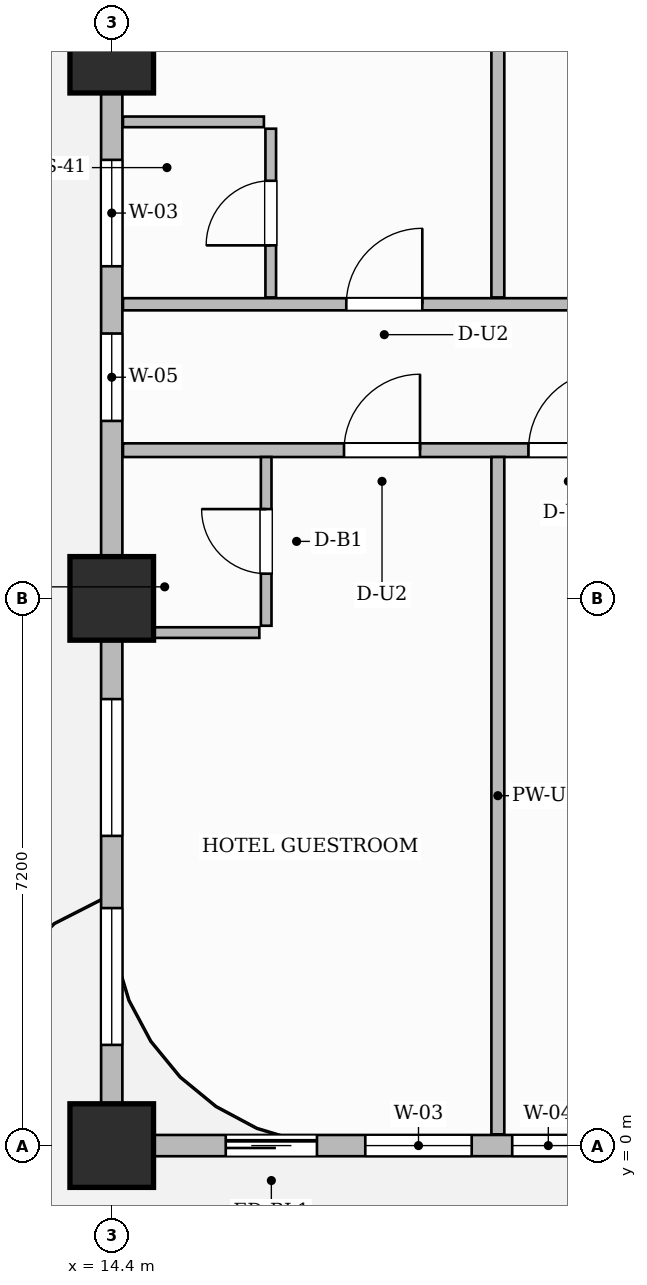
"""IFC4 building model, lengths in metres.
Left out: names, types, materials, properties, quantities, classifications, styles, units other than length and angle.
Written with IfcOpenShell. Run it as: python <this file> out.ifc"""

import sys

from ifc_helpers import new_model, si_unit, direction, frame, frame_2d, origin, origin_2d, place, context, subcontext, project, spatial, rectangle, extrude, source, transform, mapped, element, fill, save


model = new_model("IFC4")
c1 = context("Model", 3, precision=1e-05, world=origin(), true_north=direction((0.0, 1.0)))
c2 = subcontext(c1, "Body", "Model", "MODEL_VIEW")
j1 = project(units=[si_unit("LENGTHUNIT", "METRE"), si_unit("PLANEANGLEUNIT", "RADIAN")], contexts=[c1])
p1 = place(None, origin())
s1 = spatial("IfcSite", under=j1, at=p1, CompositionType="ELEMENT")
p2 = place(p1, origin())
s2 = spatial("IfcBuilding", under=s1, at=p2, CompositionType="ELEMENT")
p3 = place(p2, frame((0.0, 0.0, 36.1)))
s3 = spatial("IfcBuildingStorey", under=s2, at=p3, CompositionType="ELEMENT", Elevation=36.1)
m1 = source(origin(), c2, "Body", "SweptSolid", [
    extrude(rectangle(XDim=1.1, YDim=1.1, at=origin_2d()), origin(), (0.0, 0.0, 1.0), 3.7),
])
for number, where, z_axis, x_axis in (
    (1, (14.4, 0.0, 0.0), (0.0, 0.0, 1.0), (1.0, 0.0, 0.0)),
    (2, (14.4, 7.2, 0.0), (0.0, 0.0, 1.0), (1.0, 0.0, 0.0)),
    (3, (14.4, 14.4, 0.0), (0.0, 0.0, 1.0), (1.0, 0.0, 0.0)),
):
    element("IfcColumn", number, at=place(p3, frame(where, z_axis=z_axis, x_axis=x_axis)), inside=s3, PredefinedType="COLUMN", context=c2, shape_type="MappedRepresentation", body=[
        mapped(m1, transform((0.0, 0.0, 0.0), scale=1.0)),
    ])
p4 = place(p3, frame((14.548, 9.15, 0.0), z_axis=(0.0, 0.0, 1.0), x_axis=(1.0, 0.0, 0.0)))
e4 = element("IfcWall", 4, at=p4, inside=s3, PredefinedType="PARTITIONING", context=c2, shape_type="SweptSolid", body=[
    extrude(rectangle(XDim=15.562, YDim=0.18, at=frame_2d((7.781, 0.0))), origin(), (0.0, 0.0, 1.0), 3.45),
])
p5 = place(p4, frame((2.908, 0.0, 0.0)))
e5 = element("IfcOpeningElement", 5, at=p5, cuts=e4, PredefinedType="OPENING", context=c2, shape_type="SweptSolid", body=[
    extrude(rectangle(XDim=1.0, YDim=2.2, at=frame_2d((0.5, 1.1))), frame((0.0, 0.1, 0.0), z_axis=(0.0, -1.0, 0.0), x_axis=(1.0, 0.0, 0.0)), (0.0, 0.0, 1.0), 0.2),
])
p6 = place(p4, frame((5.334, 0.0, 0.0)))
e6 = element("IfcOpeningElement", 6, at=p6, cuts=e4, PredefinedType="OPENING", context=c2, shape_type="SweptSolid", body=[
    extrude(rectangle(XDim=1.05, YDim=2.25, at=frame_2d((0.525, 1.125))), frame((0.0, 0.1, 0.0), z_axis=(0.0, -1.0, 0.0), x_axis=(1.0, 0.0, 0.0)), (0.0, 0.0, 1.0), 0.2),
])
p7 = place(p4, frame((13.72, 0.0, 0.0)))
e7 = element("IfcOpeningElement", 7, at=p7, cuts=e4, PredefinedType="OPENING", context=c2, shape_type="SweptSolid", body=[
    extrude(rectangle(XDim=1.0, YDim=2.2, at=frame_2d((0.5, 1.1))), frame((0.0, 0.1, 0.0), z_axis=(0.0, -1.0, 0.0), x_axis=(1.0, 0.0, 0.0)), (0.0, 0.0, 1.0), 0.2),
])
p8 = place(p3, frame((14.548, 11.07, 0.0), z_axis=(0.0, 0.0, 1.0), x_axis=(1.0, 0.0, 0.0)))
e8 = element("IfcWall", 8, at=p8, inside=s3, PredefinedType="PARTITIONING", context=c2, shape_type="SweptSolid", body=[
    extrude(rectangle(XDim=15.562, YDim=0.16, at=frame_2d((7.781, 0.0))), origin(), (0.0, 0.0, 1.0), 3.45),
])
p9 = place(p8, frame((2.938, 0.0, 0.0)))
e9 = element("IfcOpeningElement", 9, at=p9, cuts=e8, PredefinedType="OPENING", context=c2, shape_type="SweptSolid", body=[
    extrude(rectangle(XDim=1.0, YDim=2.2, at=frame_2d((0.5, 1.1))), frame((0.0, 0.09, 0.0), z_axis=(0.0, -1.0, 0.0), x_axis=(1.0, 0.0, 0.0)), (0.0, 0.0, 1.0), 0.18),
])
p10 = place(p8, frame((6.667, 0.0, 0.0)))
e10 = element("IfcOpeningElement", 10, at=p10, cuts=e8, PredefinedType="OPENING", context=c2, shape_type="SweptSolid", body=[
    extrude(rectangle(XDim=1.05, YDim=2.25, at=frame_2d((0.525, 1.125))), frame((0.0, 0.09, 0.0), z_axis=(0.0, -1.0, 0.0), x_axis=(1.0, 0.0, 0.0)), (0.0, 0.0, 1.0), 0.18),
])
p11 = place(p3, frame((19.48, 0.148, 0.0), z_axis=(0.0, 0.0, 1.0), x_axis=(0.0, 1.0, 0.0)))
e11 = element("IfcWall", 11, at=p11, inside=s3, PredefinedType="PARTITIONING", context=c2, shape_type="SweptSolid", body=[
    extrude(rectangle(XDim=8.912, YDim=0.17, at=frame_2d((4.456, 0.0))), origin(), (0.0, 0.0, 1.0), 3.45),
])
p12 = place(p3, frame((16.432, 6.84, 0.0), z_axis=(0.0, 0.0, 1.0), x_axis=(0.0, 1.0, 0.0)))
e12 = element("IfcWall", 12, at=p12, inside=s3, PredefinedType="PARTITIONING", context=c2, shape_type="SweptSolid", body=[
    extrude(rectangle(XDim=2.22, YDim=0.14, at=frame_2d((1.11, 0.0))), origin(), (0.0, 0.0, 1.0), 3.45),
])
p13 = place(p12, frame((0.685, 0.0, 0.0)))
e13 = element("IfcOpeningElement", 13, at=p13, cuts=e12, PredefinedType="OPENING", context=c2, shape_type="SweptSolid", body=[
    extrude(rectangle(XDim=0.85, YDim=2.1, at=frame_2d((0.425, 1.05))), frame((0.0, 0.08, 0.0), z_axis=(0.0, -1.0, 0.0), x_axis=(1.0, 0.0, 0.0)), (0.0, 0.0, 1.0), 0.16),
])
p14 = place(p3, frame((14.49, 6.75, 0.0), z_axis=(0.0, 0.0, 1.0), x_axis=(1.0, 0.0, 0.0)))
e14 = element("IfcWall", 14, at=p14, inside=s3, PredefinedType="PARTITIONING", context=c2, shape_type="SweptSolid", body=[
    extrude(rectangle(XDim=1.852, YDim=0.14, at=frame_2d((0.926, 0.0))), origin(), (0.0, 0.0, 1.0), 3.45),
])
p15 = place(p3, frame((19.48, 11.16, 0.0), z_axis=(0.0, 0.0, 1.0), x_axis=(0.0, 1.0, 0.0)))
e15 = element("IfcWall", 15, at=p15, inside=s3, PredefinedType="PARTITIONING", context=c2, shape_type="SweptSolid", body=[
    extrude(rectangle(XDim=10.292, YDim=0.17, at=frame_2d((5.146, 0.0))), origin(), (0.0, 0.0, 1.0), 3.45),
])
p16 = place(p3, frame((16.492, 11.16, 0.0), z_axis=(0.0, 0.0, 1.0), x_axis=(0.0, 1.0, 0.0)))
e16 = element("IfcWall", 16, at=p16, inside=s3, PredefinedType="PARTITIONING", context=c2, shape_type="SweptSolid", body=[
    extrude(rectangle(XDim=2.22, YDim=0.14, at=frame_2d((1.11, 0.0))), origin(), (0.0, 0.0, 1.0), 3.45),
])
p17 = place(p16, frame((0.685, 0.0, 0.0)))
e17 = element("IfcOpeningElement", 17, at=p17, cuts=e16, PredefinedType="OPENING", context=c2, shape_type="SweptSolid", body=[
    extrude(rectangle(XDim=0.85, YDim=2.1, at=frame_2d((0.425, 1.05))), frame((0.0, 0.08, 0.0), z_axis=(0.0, -1.0, 0.0), x_axis=(1.0, 0.0, 0.0)), (0.0, 0.0, 1.0), 0.16),
])
p18 = place(p3, frame((14.548, 13.47, 0.0), z_axis=(0.0, 0.0, 1.0), x_axis=(1.0, 0.0, 0.0)))
e18 = element("IfcWall", 18, at=p18, inside=s3, PredefinedType="PARTITIONING", context=c2, shape_type="SweptSolid", body=[
    extrude(rectangle(XDim=1.854, YDim=0.14, at=frame_2d((0.927, 0.0))), origin(), (0.0, 0.0, 1.0), 3.45),
])
p19 = place(p3, frame((14.4, 0.0, 0.0), z_axis=(0.0, 0.0, 1.0), x_axis=(1.0, 0.0, 0.0)))
e19 = element("IfcWall", 19, at=p19, inside=s3, PredefinedType="SOLIDWALL", context=c2, shape_type="SweptSolid", body=[
    extrude(rectangle(XDim=43.2, YDim=0.28, at=frame_2d((21.6, 0.0))), origin(), (0.0, 0.0, 1.0), 2.885),
])
p20 = place(p19, frame((1.5, 0.0, 0.0)))
e20 = element("IfcOpeningElement", 20, at=p20, cuts=e19, PredefinedType="OPENING", context=c2, shape_type="SweptSolid", body=[
    extrude(rectangle(XDim=1.2, YDim=2.2, at=frame_2d((0.6, 1.1))), frame((0.0, 0.15, 0.0), z_axis=(0.0, -1.0, 0.0), x_axis=(1.0, 0.0, 0.0)), (0.0, 0.0, 1.0), 0.3),
])
p21 = place(p19, frame((3.336, 0.0, 0.8)))
e21 = element("IfcOpeningElement", 21, at=p21, cuts=e19, PredefinedType="OPENING", context=c2, shape_type="SweptSolid", body=[
    extrude(rectangle(XDim=1.4, YDim=1.85, at=frame_2d((0.7, 0.925))), frame((0.0, 0.15, 0.0), z_axis=(0.0, -1.0, 0.0), x_axis=(1.0, 0.0, 0.0)), (0.0, 0.0, 1.0), 0.3),
])
p22 = place(p19, frame((5.269, 0.0, 0.8)))
e22 = element("IfcOpeningElement", 22, at=p22, cuts=e19, PredefinedType="OPENING", context=c2, shape_type="SweptSolid", body=[
    extrude(rectangle(XDim=0.95, YDim=1.75, at=frame_2d((0.475, 0.875))), frame((0.0, 0.15, 0.0), z_axis=(0.0, -1.0, 0.0), x_axis=(1.0, 0.0, 0.0)), (0.0, 0.0, 1.0), 0.3),
])
p23 = place(p19, frame((8.389, 0.0, 0.8)))
e23 = element("IfcOpeningElement", 23, at=p23, cuts=e19, PredefinedType="OPENING", context=c2, shape_type="SweptSolid", body=[
    extrude(rectangle(XDim=1.8, YDim=1.85, at=frame_2d((0.9, 0.925))), frame((0.0, 0.15, 0.0), z_axis=(0.0, -1.0, 0.0), x_axis=(1.0, 0.0, 0.0)), (0.0, 0.0, 1.0), 0.3),
])
p24 = place(p19, frame((11.197, 0.0, 0.8)))
e24 = element("IfcOpeningElement", 24, at=p24, cuts=e19, PredefinedType="OPENING", context=c2, shape_type="SweptSolid", body=[
    extrude(rectangle(XDim=1.8, YDim=1.85, at=frame_2d((0.9, 0.925))), frame((0.0, 0.15, 0.0), z_axis=(0.0, -1.0, 0.0), x_axis=(1.0, 0.0, 0.0)), (0.0, 0.0, 1.0), 0.3),
])
p25 = place(p19, frame((16.804, 0.0, 0.8)))
e25 = element("IfcOpeningElement", 25, at=p25, cuts=e19, PredefinedType="OPENING", context=c2, shape_type="SweptSolid", body=[
    extrude(rectangle(XDim=1.8, YDim=1.85, at=frame_2d((0.9, 0.925))), frame((0.0, 0.15, 0.0), z_axis=(0.0, -1.0, 0.0), x_axis=(1.0, 0.0, 0.0)), (0.0, 0.0, 1.0), 0.3),
])
p26 = place(p19, frame((21.725, 0.0, 0.8)))
e26 = element("IfcOpeningElement", 26, at=p26, cuts=e19, PredefinedType="OPENING", context=c2, shape_type="SweptSolid", body=[
    extrude(rectangle(XDim=1.8, YDim=1.85, at=frame_2d((0.9, 0.925))), frame((0.0, 0.15, 0.0), z_axis=(0.0, -1.0, 0.0), x_axis=(1.0, 0.0, 0.0)), (0.0, 0.0, 1.0), 0.3),
])
p27 = place(p19, frame((24.475, 0.0, 0.8)))
e27 = element("IfcOpeningElement", 27, at=p27, cuts=e19, PredefinedType="OPENING", context=c2, shape_type="SweptSolid", body=[
    extrude(rectangle(XDim=1.8, YDim=1.85, at=frame_2d((0.9, 0.925))), frame((0.0, 0.15, 0.0), z_axis=(0.0, -1.0, 0.0), x_axis=(1.0, 0.0, 0.0)), (0.0, 0.0, 1.0), 0.3),
])
p28 = place(p19, frame((29.075, 0.0, 0.8)))
e28 = element("IfcOpeningElement", 28, at=p28, cuts=e19, PredefinedType="OPENING", context=c2, shape_type="SweptSolid", body=[
    extrude(rectangle(XDim=1.8, YDim=1.85, at=frame_2d((0.9, 0.925))), frame((0.0, 0.15, 0.0), z_axis=(0.0, -1.0, 0.0), x_axis=(1.0, 0.0, 0.0)), (0.0, 0.0, 1.0), 0.3),
])
p29 = place(p19, frame((32.125, 0.0, 0.8)))
e29 = element("IfcOpeningElement", 29, at=p29, cuts=e19, PredefinedType="OPENING", context=c2, shape_type="SweptSolid", body=[
    extrude(rectangle(XDim=1.8, YDim=1.85, at=frame_2d((0.9, 0.925))), frame((0.0, 0.15, 0.0), z_axis=(0.0, -1.0, 0.0), x_axis=(1.0, 0.0, 0.0)), (0.0, 0.0, 1.0), 0.3),
])
p30 = place(p19, frame((36.875, 0.0, 0.8)))
e30 = element("IfcOpeningElement", 30, at=p30, cuts=e19, PredefinedType="OPENING", context=c2, shape_type="SweptSolid", body=[
    extrude(rectangle(XDim=1.8, YDim=1.85, at=frame_2d((0.9, 0.925))), frame((0.0, 0.15, 0.0), z_axis=(0.0, -1.0, 0.0), x_axis=(1.0, 0.0, 0.0)), (0.0, 0.0, 1.0), 0.3),
])
p31 = place(p19, frame((39.925, 0.0, 0.8)))
e31 = element("IfcOpeningElement", 31, at=p31, cuts=e19, PredefinedType="OPENING", context=c2, shape_type="SweptSolid", body=[
    extrude(rectangle(XDim=1.8, YDim=1.85, at=frame_2d((0.9, 0.925))), frame((0.0, 0.15, 0.0), z_axis=(0.0, -1.0, 0.0), x_axis=(1.0, 0.0, 0.0)), (0.0, 0.0, 1.0), 0.3),
])
p32 = place(p3, frame((14.4, 0.05, 0.0), z_axis=(0.0, 0.0, 1.0), x_axis=(0.0, 1.0, 0.0)))
e32 = element("IfcWall", 32, at=p32, inside=s3, PredefinedType="SOLIDWALL", context=c2, shape_type="SweptSolid", body=[
    extrude(rectangle(XDim=21.5, YDim=0.28, at=frame_2d((10.75, 0.0))), origin(), (0.0, 0.0, 1.0), 2.885),
])
p33 = place(p32, frame((1.275, 0.0, 0.8)))
e33 = element("IfcOpeningElement", 33, at=p33, cuts=e32, PredefinedType="OPENING", context=c2, shape_type="SweptSolid", body=[
    extrude(rectangle(XDim=1.8, YDim=1.85, at=frame_2d((0.9, 0.925))), frame((0.0, 0.15, 0.0), z_axis=(0.0, -1.0, 0.0), x_axis=(1.0, 0.0, 0.0)), (0.0, 0.0, 1.0), 0.3),
])
p34 = place(p32, frame((4.025, 0.0, 0.8)))
e34 = element("IfcOpeningElement", 34, at=p34, cuts=e32, PredefinedType="OPENING", context=c2, shape_type="SweptSolid", body=[
    extrude(rectangle(XDim=1.8, YDim=1.85, at=frame_2d((0.9, 0.925))), frame((0.0, 0.15, 0.0), z_axis=(0.0, -1.0, 0.0), x_axis=(1.0, 0.0, 0.0)), (0.0, 0.0, 1.0), 0.3),
])
p35 = place(p32, frame((9.485, 0.0, 0.8)))
e35 = element("IfcOpeningElement", 35, at=p35, cuts=e32, PredefinedType="OPENING", context=c2, shape_type="SweptSolid", body=[
    extrude(rectangle(XDim=1.15, YDim=1.8, at=frame_2d((0.575, 0.9))), frame((0.0, 0.15, 0.0), z_axis=(0.0, -1.0, 0.0), x_axis=(1.0, 0.0, 0.0)), (0.0, 0.0, 1.0), 0.3),
])
p36 = place(p32, frame((11.52, 0.0, 0.8)))
e36 = element("IfcOpeningElement", 36, at=p36, cuts=e32, PredefinedType="OPENING", context=c2, shape_type="SweptSolid", body=[
    extrude(rectangle(XDim=1.4, YDim=1.85, at=frame_2d((0.7, 0.925))), frame((0.0, 0.15, 0.0), z_axis=(0.0, -1.0, 0.0), x_axis=(1.0, 0.0, 0.0)), (0.0, 0.0, 1.0), 0.3),
])
p37 = place(p32, frame((15.675, 0.0, 0.8)))
e37 = element("IfcOpeningElement", 37, at=p37, cuts=e32, PredefinedType="OPENING", context=c2, shape_type="SweptSolid", body=[
    extrude(rectangle(XDim=1.8, YDim=1.85, at=frame_2d((0.9, 0.925))), frame((0.0, 0.15, 0.0), z_axis=(0.0, -1.0, 0.0), x_axis=(1.0, 0.0, 0.0)), (0.0, 0.0, 1.0), 0.3),
])
p38 = place(p32, frame((18.425, 0.0, 0.8)))
e38 = element("IfcOpeningElement", 38, at=p38, cuts=e32, PredefinedType="OPENING", context=c2, shape_type="SweptSolid", body=[
    extrude(rectangle(XDim=1.8, YDim=1.85, at=frame_2d((0.9, 0.925))), frame((0.0, 0.15, 0.0), z_axis=(0.0, -1.0, 0.0), x_axis=(1.0, 0.0, 0.0)), (0.0, 0.0, 1.0), 0.3),
])
m2 = source(origin(), c2, "Body", "SweptSolid", [
    extrude(rectangle(XDim=0.85, YDim=2.1, at=frame_2d((0.425, 1.05))), frame((0.0, 0.025, 0.0), z_axis=(0.0, -1.0, 0.0), x_axis=(1.0, 0.0, 0.0)), (0.0, 0.0, 1.0), 0.05),
])
p39 = place(p13, origin())
e39 = element("IfcDoor", 39, at=p39, inside=s3, OperationType="SINGLE_SWING_RIGHT", PredefinedType="DOOR", context=c2, shape_type="MappedRepresentation", body=[
    mapped(m2, transform((0.0, 0.0, 0.0), scale=1.0)),
])
fill(e13, e39)
m3 = source(origin(), c2, "Body", "SweptSolid", [
    extrude(rectangle(XDim=1.0, YDim=2.2, at=frame_2d((0.5, 1.1))), frame((0.0, 0.025, 0.0), z_axis=(0.0, -1.0, 0.0), x_axis=(1.0, 0.0, 0.0)), (0.0, 0.0, 1.0), 0.05),
])
p40 = place(p5, origin())
e40 = element("IfcDoor", 40, at=p40, inside=s3, OperationType="SINGLE_SWING_RIGHT", PredefinedType="DOOR", context=c2, shape_type="MappedRepresentation", body=[
    mapped(m3, transform((0.0, 0.0, 0.0), scale=1.0)),
])
fill(e5, e40)
m4 = source(origin(), c2, "Body", "SweptSolid", [
    extrude(rectangle(XDim=1.05, YDim=2.25, at=frame_2d((0.525, 1.125))), frame((0.0, 0.025, 0.0), z_axis=(0.0, -1.0, 0.0), x_axis=(1.0, 0.0, 0.0)), (0.0, 0.0, 1.0), 0.05),
])
p41 = place(p6, origin())
e41 = element("IfcDoor", 41, at=p41, inside=s3, OperationType="SINGLE_SWING_RIGHT", PredefinedType="DOOR", context=c2, shape_type="MappedRepresentation", body=[
    mapped(m4, transform((0.0, 0.0, 0.0), scale=1.0)),
])
fill(e6, e41)
p42 = place(p17, origin())
e42 = element("IfcDoor", 42, at=p42, inside=s3, OperationType="SINGLE_SWING_LEFT", PredefinedType="DOOR", context=c2, shape_type="MappedRepresentation", body=[
    mapped(m2, transform((0.0, 0.0, 0.0), scale=1.0)),
])
fill(e17, e42)
p43 = place(p9, origin())
e43 = element("IfcDoor", 43, at=p43, inside=s3, OperationType="SINGLE_SWING_RIGHT", PredefinedType="DOOR", context=c2, shape_type="MappedRepresentation", body=[
    mapped(m3, transform((0.0, 0.0, 0.0), scale=1.0)),
])
fill(e9, e43)
m5 = source(origin(), c2, "Body", "SweptSolid", [
    extrude(rectangle(XDim=1.2, YDim=2.2, at=frame_2d((0.6, 1.1))), frame((0.0, 0.025, 0.0), z_axis=(0.0, -1.0, 0.0), x_axis=(1.0, 0.0, 0.0)), (0.0, 0.0, 1.0), 0.05),
])
p44 = place(p20, origin())
e44 = element("IfcDoor", 44, at=p44, inside=s3, OperationType="SLIDING_TO_LEFT", PredefinedType="DOOR", context=c2, shape_type="MappedRepresentation", body=[
    mapped(m5, transform((0.0, 0.0, 0.0), scale=1.0)),
])
fill(e20, e44)
m6 = source(origin(), c2, "Body", "SweptSolid", [
    extrude(rectangle(XDim=1.4, YDim=1.85, at=frame_2d((0.7, 0.925))), frame((0.0, 0.03, 0.0), z_axis=(0.0, -1.0, 0.0), x_axis=(1.0, 0.0, 0.0)), (0.0, 0.0, 1.0), 0.06),
])
p45 = place(p21, origin())
e45 = element("IfcWindow", 45, at=p45, inside=s3, PartitioningType="SINGLE_PANEL", PredefinedType="WINDOW", context=c2, shape_type="MappedRepresentation", body=[
    mapped(m6, transform((0.0, 0.0, 0.0), scale=1.0)),
])
fill(e21, e45)
m7 = source(origin(), c2, "Body", "SweptSolid", [
    extrude(rectangle(XDim=0.95, YDim=1.75, at=frame_2d((0.475, 0.875))), frame((0.0, 0.03, 0.0), z_axis=(0.0, -1.0, 0.0), x_axis=(1.0, 0.0, 0.0)), (0.0, 0.0, 1.0), 0.06),
])
p46 = place(p22, origin())
e46 = element("IfcWindow", 46, at=p46, inside=s3, PartitioningType="SINGLE_PANEL", PredefinedType="WINDOW", context=c2, shape_type="MappedRepresentation", body=[
    mapped(m7, transform((0.0, 0.0, 0.0), scale=1.0)),
])
fill(e22, e46)
m8 = source(origin(), c2, "Body", "SweptSolid", [
    extrude(rectangle(XDim=1.8, YDim=1.85, at=frame_2d((0.9, 0.925))), frame((0.0, 0.03, 0.0), z_axis=(0.0, -1.0, 0.0), x_axis=(1.0, 0.0, 0.0)), (0.0, 0.0, 1.0), 0.06),
])
p47 = place(p33, origin())
e47 = element("IfcWindow", 47, at=p47, inside=s3, PartitioningType="DOUBLE_PANEL_VERTICAL", PredefinedType="WINDOW", context=c2, shape_type="MappedRepresentation", body=[
    mapped(m8, transform((0.0, 0.0, 0.0), scale=1.0)),
])
fill(e33, e47)
p48 = place(p34, origin())
e48 = element("IfcWindow", 48, at=p48, inside=s3, PartitioningType="DOUBLE_PANEL_VERTICAL", PredefinedType="WINDOW", context=c2, shape_type="MappedRepresentation", body=[
    mapped(m8, transform((0.0, 0.0, 0.0), scale=1.0)),
])
fill(e34, e48)
m9 = source(origin(), c2, "Body", "SweptSolid", [
    extrude(rectangle(XDim=1.15, YDim=1.8, at=frame_2d((0.575, 0.9))), frame((0.0, 0.03, 0.0), z_axis=(0.0, -1.0, 0.0), x_axis=(1.0, 0.0, 0.0)), (0.0, 0.0, 1.0), 0.06),
])
p49 = place(p35, origin())
e49 = element("IfcWindow", 49, at=p49, inside=s3, PartitioningType="SINGLE_PANEL", PredefinedType="WINDOW", context=c2, shape_type="MappedRepresentation", body=[
    mapped(m9, transform((0.0, 0.0, 0.0), scale=1.0)),
])
fill(e35, e49)
p50 = place(p36, origin())
e50 = element("IfcWindow", 50, at=p50, inside=s3, PartitioningType="SINGLE_PANEL", PredefinedType="WINDOW", context=c2, shape_type="MappedRepresentation", body=[
    mapped(m6, transform((0.0, 0.0, 0.0), scale=1.0)),
])
fill(e36, e50)
save(model, sys.argv[1])
